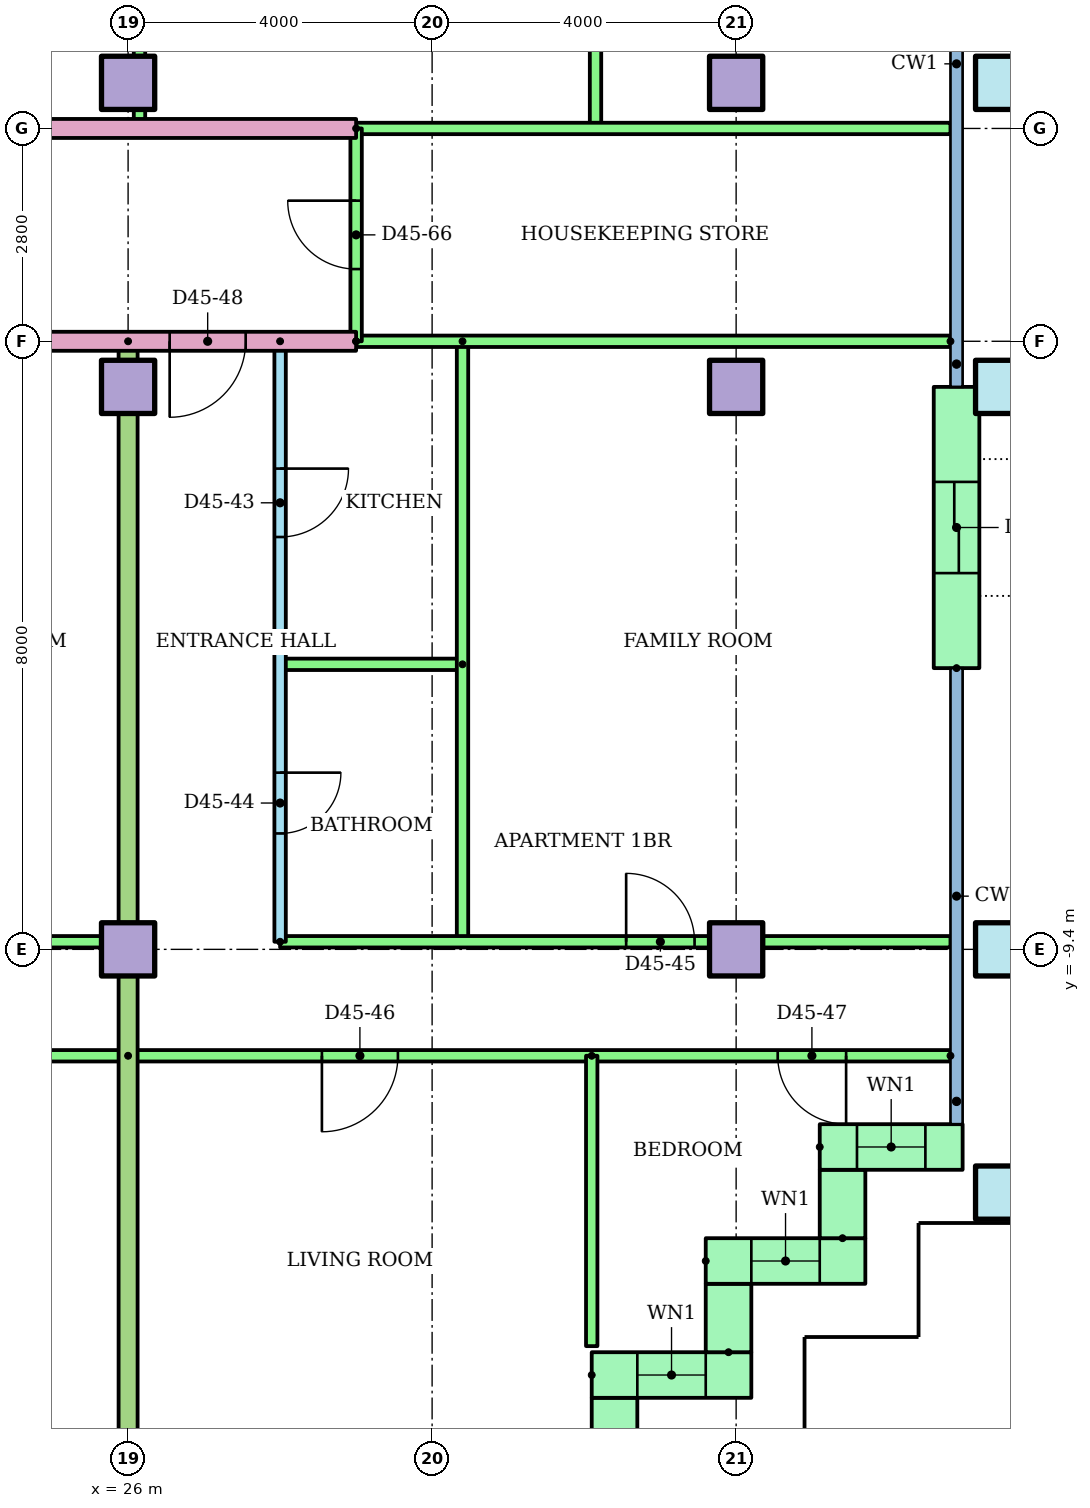
"""IFC4 building model, lengths in metres.
Left out: names, types, materials, properties, quantities, classifications, styles, units other than length and angle.
Written with IfcOpenShell. Run it as: python <this file> out.ifc"""

import sys

from ifc_helpers import new_model, si_unit, direction, frame, frame_2d, origin, origin_2d, place, context, subcontext, project, spatial, rectangle, hollow_rectangle, extrude, element, fill, save


model = new_model("IFC4")
c1 = context("Model", 3, precision=1e-05, world=origin(), true_north=direction((0.0, 1.0)))
c2 = subcontext(c1, "Body", "Model", "MODEL_VIEW")
j1 = project(units=[si_unit("LENGTHUNIT", "METRE"), si_unit("PLANEANGLEUNIT", "RADIAN")], contexts=[c1])
p1 = place(None, origin())
s1 = spatial("IfcSite", under=j1, at=p1, CompositionType="ELEMENT")
p2 = place(p1, origin())
s2 = spatial("IfcBuilding", under=s1, at=p2, CompositionType="ELEMENT")
p3 = place(p2, frame((0.0, 0.0, 174.9)))
s3 = spatial("IfcBuildingStorey", under=s2, at=p3, CompositionType="ELEMENT", Elevation=174.9)
p4 = place(p3, frame((37.5, -12.6, 0.0)))
e1 = element("IfcColumn", 1, at=p4, inside=s3, PredefinedType="COLUMN", context=c2, shape_type="SweptSolid", body=[
    extrude(hollow_rectangle(XDim=0.7, YDim=0.7, WallThickness=0.036, at=origin_2d()), origin(), (0.0, 0.0, 1.0), 3.2),
])
for number, where in (
    (2, (26.0, -9.4, 0.0)),
    (3, (34.0, -9.4, 0.0)),
):
    element("IfcColumn", number, at=place(p3, frame(where)), inside=s3, PredefinedType="COLUMN", context=c2, shape_type="SweptSolid", body=[
        extrude(rectangle(XDim=0.7, YDim=0.7, at=origin_2d()), origin(), (0.0, 0.0, 1.0), 3.2),
    ])
p5 = place(p3, frame((37.5, -9.4, 0.0)))
e4 = element("IfcColumn", 4, at=p5, inside=s3, PredefinedType="COLUMN", context=c2, shape_type="SweptSolid", body=[
    extrude(hollow_rectangle(XDim=0.7, YDim=0.7, WallThickness=0.036, at=origin_2d()), origin(), (0.0, 0.0, 1.0), 3.2),
])
for number, where in (
    (5, (26.0, -2.0, 0.0)),
    (6, (34.0, -2.0, 0.0)),
):
    element("IfcColumn", number, at=place(p3, frame(where)), inside=s3, PredefinedType="COLUMN", context=c2, shape_type="SweptSolid", body=[
        extrude(rectangle(XDim=0.7, YDim=0.7, at=origin_2d()), origin(), (0.0, 0.0, 1.0), 3.2),
    ])
p6 = place(p3, frame((37.5, -2.0, 0.0)))
e7 = element("IfcColumn", 7, at=p6, inside=s3, PredefinedType="COLUMN", context=c2, shape_type="SweptSolid", body=[
    extrude(hollow_rectangle(XDim=0.7, YDim=0.7, WallThickness=0.036, at=origin_2d()), origin(), (0.0, 0.0, 1.0), 3.2),
])
for number, where in (
    (8, (26.0, 2.0, 0.0)),
    (9, (34.0, 2.0, 0.0)),
):
    element("IfcColumn", number, at=place(p3, frame(where)), inside=s3, PredefinedType="COLUMN", context=c2, shape_type="SweptSolid", body=[
        extrude(rectangle(XDim=0.7, YDim=0.7, at=origin_2d()), origin(), (0.0, 0.0, 1.0), 3.2),
    ])
p7 = place(p3, frame((37.5, 2.0, 0.0)))
e10 = element("IfcColumn", 10, at=p7, inside=s3, PredefinedType="COLUMN", context=c2, shape_type="SweptSolid", body=[
    extrude(hollow_rectangle(XDim=0.7, YDim=0.7, WallThickness=0.036, at=origin_2d()), origin(), (0.0, 0.0, 1.0), 3.2),
])
p8 = place(p3, frame((32.4, -16.58, 0.0), z_axis=(0.0, 0.0, 1.0), x_axis=(0.0, 1.0, 0.0)))
e11 = element("IfcWall", 11, at=p8, inside=s3, PredefinedType="STANDARD", context=c2, shape_type="SweptSolid", body=[
    extrude(rectangle(XDim=1.28, YDim=0.6, at=frame_2d((0.64, 0.0))), origin(), (0.0, 0.0, 1.0), 2.92),
])
p9 = place(p3, frame((32.1, -15.0, 0.0)))
e12 = element("IfcWall", 12, at=p9, inside=s3, PredefinedType="STANDARD", context=c2, shape_type="SweptSolid", body=[
    extrude(rectangle(XDim=2.1, YDim=0.6, at=frame_2d((1.05, 0.0))), origin(), (0.0, 0.0, 1.0), 2.92),
])
p10 = place(p9, frame((0.6, 0.0, 0.9)))
e13 = element("IfcOpeningElement", 13, at=p10, cuts=e12, PredefinedType="OPENING", context=c2, shape_type="SweptSolid", body=[
    extrude(rectangle(XDim=0.9, YDim=1.5, at=frame_2d((0.45, 0.75))), frame((0.0, 0.31, 0.0), z_axis=(0.0, -1.0, 0.0), x_axis=(1.0, 0.0, 0.0)), (0.0, 0.0, 1.0), 0.62),
])
p11 = place(p3, frame((33.9, -14.7, 0.0), z_axis=(0.0, 0.0, 1.0), x_axis=(0.0, 1.0, 0.0)))
e14 = element("IfcWall", 14, at=p11, inside=s3, PredefinedType="STANDARD", context=c2, shape_type="SweptSolid", body=[
    extrude(rectangle(XDim=0.9, YDim=0.6, at=frame_2d((0.45, 0.0))), origin(), (0.0, 0.0, 1.0), 2.92),
])
p12 = place(p3, frame((33.6, -13.5, 0.0)))
e15 = element("IfcWall", 15, at=p12, inside=s3, PredefinedType="STANDARD", context=c2, shape_type="SweptSolid", body=[
    extrude(rectangle(XDim=2.1, YDim=0.6, at=frame_2d((1.05, 0.0))), origin(), (0.0, 0.0, 1.0), 2.92),
])
p13 = place(p12, frame((0.6, 0.0, 0.9)))
e16 = element("IfcOpeningElement", 16, at=p13, cuts=e15, PredefinedType="OPENING", context=c2, shape_type="SweptSolid", body=[
    extrude(rectangle(XDim=0.9, YDim=1.5, at=frame_2d((0.45, 0.75))), frame((0.0, 0.31, 0.0), z_axis=(0.0, -1.0, 0.0), x_axis=(1.0, 0.0, 0.0)), (0.0, 0.0, 1.0), 0.62),
])
p14 = place(p3, frame((35.4, -13.2, 0.0), z_axis=(0.0, 0.0, 1.0), x_axis=(0.0, 1.0, 0.0)))
e17 = element("IfcWall", 17, at=p14, inside=s3, PredefinedType="STANDARD", context=c2, shape_type="SweptSolid", body=[
    extrude(rectangle(XDim=0.9, YDim=0.6, at=frame_2d((0.45, 0.0))), origin(), (0.0, 0.0, 1.0), 2.92),
])
p15 = place(p3, frame((35.1, -12.0, 0.0)))
e18 = element("IfcWall", 18, at=p15, inside=s3, PredefinedType="STANDARD", context=c2, shape_type="SweptSolid", body=[
    extrude(rectangle(XDim=1.88, YDim=0.6, at=frame_2d((0.94, 0.0))), origin(), (0.0, 0.0, 1.0), 2.92),
])
p16 = place(p15, frame((0.49, 0.0, 0.9)))
e19 = element("IfcOpeningElement", 19, at=p16, cuts=e18, PredefinedType="OPENING", context=c2, shape_type="SweptSolid", body=[
    extrude(rectangle(XDim=0.9, YDim=1.5, at=frame_2d((0.45, 0.75))), frame((0.0, 0.31, 0.0), z_axis=(0.0, -1.0, 0.0), x_axis=(1.0, 0.0, 0.0)), (0.0, 0.0, 1.0), 0.62),
])
p17 = place(p3, frame((36.9, -5.7, 0.0), z_axis=(0.0, 0.0, 1.0), x_axis=(0.0, 1.0, 0.0)))
e20 = element("IfcWall", 20, at=p17, inside=s3, PredefinedType="STANDARD", context=c2, shape_type="SweptSolid", body=[
    extrude(rectangle(XDim=3.7, YDim=0.6, at=frame_2d((1.85, 0.0))), origin(), (0.0, 0.0, 1.0), 2.92),
])
p18 = place(p17, frame((1.25, 0.0, 0.0)))
e21 = element("IfcOpeningElement", 21, at=p18, cuts=e20, PredefinedType="OPENING", context=c2, shape_type="SweptSolid", body=[
    extrude(rectangle(XDim=1.2, YDim=2.1, at=frame_2d((0.6, 1.05))), frame((0.0, 0.31, 0.0), z_axis=(0.0, -1.0, 0.0), x_axis=(1.0, 0.0, 0.0)), (0.0, 0.0, 1.0), 0.62),
])
p19 = place(p3, frame((20.0, -9.3, 0.0)))
e22 = element("IfcWall", 22, at=p19, inside=s3, PredefinedType="PARTITIONING", context=c2, shape_type="SweptSolid", body=[
    extrude(rectangle(XDim=6.0, YDim=0.15, at=frame_2d((3.0, 0.0))), origin(), (0.0, 0.0, 1.0), 2.4),
])
p20 = place(p19, frame((3.75, 0.0, 0.0)))
e23 = element("IfcOpeningElement", 23, at=p20, cuts=e22, PredefinedType="OPENING", context=c2, shape_type="SweptSolid", body=[
    extrude(rectangle(XDim=0.9, YDim=2.1, at=frame_2d((0.45, 1.05))), frame((0.0, 0.085, 0.0), z_axis=(0.0, -1.0, 0.0), x_axis=(1.0, 0.0, 0.0)), (0.0, 0.0, 1.0), 0.17),
])
p21 = place(p3, frame((26.0, -10.8, 0.0), z_axis=(0.0, 0.0, 1.0), x_axis=(-1.0, 0.0, 0.0)))
e24 = element("IfcWall", 24, at=p21, inside=s3, PredefinedType="PARTITIONING", context=c2, shape_type="SweptSolid", body=[
    extrude(rectangle(XDim=8.0, YDim=0.15, at=frame_2d((4.0, 0.0))), origin(), (0.0, 0.0, 1.0), 2.4),
])
p22 = place(p21, frame((5.55, 0.0, 0.0)))
e25 = element("IfcOpeningElement", 25, at=p22, cuts=e24, PredefinedType="OPENING", context=c2, shape_type="SweptSolid", body=[
    extrude(rectangle(XDim=0.9, YDim=2.1, at=frame_2d((0.45, 1.05))), frame((0.0, 0.085, 0.0), z_axis=(0.0, -1.0, 0.0), x_axis=(1.0, 0.0, 0.0)), (0.0, 0.0, 1.0), 0.17),
])
p23 = place(p21, frame((1.5, 0.0, 0.0)))
e26 = element("IfcOpeningElement", 26, at=p23, cuts=e24, PredefinedType="OPENING", context=c2, shape_type="SweptSolid", body=[
    extrude(rectangle(XDim=1.0, YDim=2.1, at=frame_2d((0.5, 1.05))), frame((0.0, 0.085, 0.0), z_axis=(0.0, -1.0, 0.0), x_axis=(1.0, 0.0, 0.0)), (0.0, 0.0, 1.0), 0.17),
])
p24 = place(p3, frame((28.0, -1.4, 0.0), z_axis=(0.0, 0.0, 1.0), x_axis=(0.0, -1.0, 0.0)))
e27 = element("IfcWall", 27, at=p24, inside=s3, PredefinedType="PARTITIONING", context=c2, shape_type="SweptSolid", body=[
    extrude(rectangle(XDim=7.9, YDim=0.15, at=frame_2d((3.95, 0.0))), origin(), (0.0, 0.0, 1.0), 2.4),
])
p25 = place(p24, frame((1.675, 0.0, 0.0)))
e28 = element("IfcOpeningElement", 28, at=p25, cuts=e27, PredefinedType="OPENING", context=c2, shape_type="SweptSolid", body=[
    extrude(rectangle(XDim=0.9, YDim=2.1, at=frame_2d((0.45, 1.05))), frame((0.0, 0.085, 0.0), z_axis=(0.0, -1.0, 0.0), x_axis=(1.0, 0.0, 0.0)), (0.0, 0.0, 1.0), 0.17),
])
p26 = place(p24, frame((5.675, 0.0, 0.0)))
e29 = element("IfcOpeningElement", 29, at=p26, cuts=e27, PredefinedType="OPENING", context=c2, shape_type="SweptSolid", body=[
    extrude(rectangle(XDim=0.8, YDim=2.1, at=frame_2d((0.4, 1.05))), frame((0.0, 0.085, 0.0), z_axis=(0.0, -1.0, 0.0), x_axis=(1.0, 0.0, 0.0)), (0.0, 0.0, 1.0), 0.17),
])
p27 = place(p3, frame((30.4, -5.65, 0.0), z_axis=(0.0, 0.0, 1.0), x_axis=(-1.0, 0.0, 0.0)))
e30 = element("IfcWall", 30, at=p27, inside=s3, PredefinedType="PARTITIONING", context=c2, shape_type="SweptSolid", body=[
    extrude(rectangle(XDim=2.4, YDim=0.15, at=frame_2d((1.2, 0.0))), origin(), (0.0, 0.0, 1.0), 2.4),
])
p28 = place(p3, frame((30.4, -1.4, 0.0), z_axis=(0.0, 0.0, 1.0), x_axis=(0.0, -1.0, 0.0)))
e31 = element("IfcWall", 31, at=p28, inside=s3, PredefinedType="PARTITIONING", context=c2, shape_type="SweptSolid", body=[
    extrude(rectangle(XDim=7.9, YDim=0.15, at=frame_2d((3.95, 0.0))), origin(), (0.0, 0.0, 1.0), 2.4),
])
p29 = place(p3, frame((28.0, -9.3, 0.0)))
e32 = element("IfcWall", 32, at=p29, inside=s3, PredefinedType="PARTITIONING", context=c2, shape_type="SweptSolid", body=[
    extrude(rectangle(XDim=8.82, YDim=0.15, at=frame_2d((4.41, 0.0))), origin(), (0.0, 0.0, 1.0), 2.4),
])
p30 = place(p29, frame((4.553, 0.0, 0.0)))
e33 = element("IfcOpeningElement", 33, at=p30, cuts=e32, PredefinedType="OPENING", context=c2, shape_type="SweptSolid", body=[
    extrude(rectangle(XDim=0.9, YDim=2.1, at=frame_2d((0.45, 1.05))), frame((0.0, 0.085, 0.0), z_axis=(0.0, -1.0, 0.0), x_axis=(1.0, 0.0, 0.0)), (0.0, 0.0, 1.0), 0.17),
])
p31 = place(p3, frame((36.82, -10.8, 0.0), z_axis=(0.0, 0.0, 1.0), x_axis=(-1.0, 0.0, 0.0)))
e34 = element("IfcWall", 34, at=p31, inside=s3, PredefinedType="PARTITIONING", context=c2, shape_type="SweptSolid", body=[
    extrude(rectangle(XDim=10.82, YDim=0.15, at=frame_2d((5.41, 0.0))), origin(), (0.0, 0.0, 1.0), 2.4),
])
p32 = place(p31, frame((7.27, 0.0, 0.0)))
e35 = element("IfcOpeningElement", 35, at=p32, cuts=e34, PredefinedType="OPENING", context=c2, shape_type="SweptSolid", body=[
    extrude(rectangle(XDim=1.0, YDim=2.1, at=frame_2d((0.5, 1.05))), frame((0.0, 0.085, 0.0), z_axis=(0.0, -1.0, 0.0), x_axis=(1.0, 0.0, 0.0)), (0.0, 0.0, 1.0), 0.17),
])
p33 = place(p31, frame((1.373, 0.0, 0.0)))
e36 = element("IfcOpeningElement", 36, at=p33, cuts=e34, PredefinedType="OPENING", context=c2, shape_type="SweptSolid", body=[
    extrude(rectangle(XDim=0.9, YDim=2.1, at=frame_2d((0.45, 1.05))), frame((0.0, 0.085, 0.0), z_axis=(0.0, -1.0, 0.0), x_axis=(1.0, 0.0, 0.0)), (0.0, 0.0, 1.0), 0.17),
])
p34 = place(p3, frame((32.1, -10.8, 0.0), z_axis=(0.0, 0.0, 1.0), x_axis=(0.0, -1.0, 0.0)))
e37 = element("IfcWall", 37, at=p34, inside=s3, PredefinedType="PARTITIONING", context=c2, shape_type="SweptSolid", body=[
    extrude(rectangle(XDim=3.82, YDim=0.15, at=frame_2d((1.91, 0.0))), origin(), (0.0, 0.0, 1.0), 2.4),
])
p35 = place(p3, frame((26.0, -1.4, 0.0), z_axis=(0.0, 0.0, 1.0), x_axis=(0.0, -1.0, 0.0)))
e38 = element("IfcWall", 38, at=p35, inside=s3, PredefinedType="PARTITIONING", context=c2, shape_type="SweptSolid", body=[
    extrude(rectangle(XDim=15.01, YDim=0.25, at=frame_2d((7.505, 0.0))), origin(), (0.0, 0.0, 1.0), 2.4),
])
p36 = place(p3, frame((29.0, -1.4, 0.0), z_axis=(0.0, 0.0, 1.0), x_axis=(-1.0, 0.0, 0.0)))
e39 = element("IfcWall", 39, at=p36, inside=s3, PredefinedType="PARTITIONING", context=c2, shape_type="SweptSolid", body=[
    extrude(rectangle(XDim=15.0, YDim=0.25, at=frame_2d((7.5, 0.0))), origin(), (0.0, 0.0, 1.0), 2.4),
])
p37 = place(p36, frame((9.453, 0.0, 0.0)))
e40 = element("IfcOpeningElement", 40, at=p37, cuts=e39, PredefinedType="OPENING", context=c2, shape_type="SweptSolid", body=[
    extrude(rectangle(XDim=1.0, YDim=2.1, at=frame_2d((0.5, 1.05))), frame((0.0, 0.135, 0.0), z_axis=(0.0, -1.0, 0.0), x_axis=(1.0, 0.0, 0.0)), (0.0, 0.0, 1.0), 0.27),
])
p38 = place(p36, frame((1.453, 0.0, 0.0)))
e41 = element("IfcOpeningElement", 41, at=p38, cuts=e39, PredefinedType="OPENING", context=c2, shape_type="SweptSolid", body=[
    extrude(rectangle(XDim=1.0, YDim=2.1, at=frame_2d((0.5, 1.05))), frame((0.0, 0.135, 0.0), z_axis=(0.0, -1.0, 0.0), x_axis=(1.0, 0.0, 0.0)), (0.0, 0.0, 1.0), 0.27),
])
p39 = place(p3, frame((36.82, -1.4, 0.0), z_axis=(0.0, 0.0, 1.0), x_axis=(-1.0, 0.0, 0.0)))
e42 = element("IfcWall", 42, at=p39, inside=s3, PredefinedType="PARTITIONING", context=c2, shape_type="SweptSolid", body=[
    extrude(rectangle(XDim=7.82, YDim=0.15, at=frame_2d((3.91, 0.0))), origin(), (0.0, 0.0, 1.0), 2.4),
])
for number, where, z_axis, x_axis in (
    (43, (26.15, 11.7, 0.0), (0.0, 0.0, 1.0), (0.0, -1.0, 0.0)),
    (44, (32.15, 11.7, 0.0), (0.0, 0.0, 1.0), (0.0, -1.0, 0.0)),
):
    element("IfcWall", number, at=place(p3, frame(where, z_axis=z_axis, x_axis=x_axis)), inside=s3, PredefinedType="PARTITIONING", context=c2, shape_type="SweptSolid", body=[
        extrude(rectangle(XDim=10.3, YDim=0.15, at=frame_2d((5.15, 0.0))), origin(), (0.0, 0.0, 1.0), 2.4),
    ])
p40 = place(p3, frame((14.0, 1.4, 0.0)))
e45 = element("IfcWall", 45, at=p40, inside=s3, PredefinedType="PARTITIONING", context=c2, shape_type="SweptSolid", body=[
    extrude(rectangle(XDim=15.0, YDim=0.25, at=frame_2d((7.5, 0.0))), origin(), (0.0, 0.0, 1.0), 2.4),
])
p41 = place(p40, frame((0.5, 0.0, 0.0)))
e46 = element("IfcOpeningElement", 46, at=p41, cuts=e45, PredefinedType="OPENING", context=c2, shape_type="SweptSolid", body=[
    extrude(rectangle(XDim=1.0, YDim=2.1, at=frame_2d((0.5, 1.05))), frame((0.0, 0.135, 0.0), z_axis=(0.0, -1.0, 0.0), x_axis=(1.0, 0.0, 0.0)), (0.0, 0.0, 1.0), 0.27),
])
p42 = place(p3, frame((29.0, 1.4, 0.0)))
e47 = element("IfcWall", 47, at=p42, inside=s3, PredefinedType="PARTITIONING", context=c2, shape_type="SweptSolid", body=[
    extrude(rectangle(XDim=7.82, YDim=0.15, at=frame_2d((3.91, 0.0))), origin(), (0.0, 0.0, 1.0), 2.4),
])
p43 = place(p3, frame((29.0, -1.4, 0.0), z_axis=(0.0, 0.0, 1.0), x_axis=(0.0, 1.0, 0.0)))
e48 = element("IfcWall", 48, at=p43, inside=s3, PredefinedType="PARTITIONING", context=c2, shape_type="SweptSolid", body=[
    extrude(rectangle(XDim=2.8, YDim=0.15, at=frame_2d((1.4, 0.0))), origin(), (0.0, 0.0, 1.0), 2.4),
])
p44 = place(p43, frame((0.95, 0.0, 0.0)))
e49 = element("IfcOpeningElement", 49, at=p44, cuts=e48, PredefinedType="OPENING", context=c2, shape_type="SweptSolid", body=[
    extrude(rectangle(XDim=0.9, YDim=2.1, at=frame_2d((0.45, 1.05))), frame((0.0, 0.085, 0.0), z_axis=(0.0, -1.0, 0.0), x_axis=(1.0, 0.0, 0.0)), (0.0, 0.0, 1.0), 0.17),
])
p45 = place(p10, origin())
e50 = element("IfcWindow", 50, at=p45, inside=s3, PartitioningType="SINGLE_PANEL", PredefinedType="WINDOW", context=c2, shape_type="SweptSolid", body=[
    extrude(rectangle(XDim=0.9, YDim=1.5, at=frame_2d((0.45, 0.75))), frame((0.0, 0.03, 0.0), z_axis=(0.0, -1.0, 0.0), x_axis=(1.0, 0.0, 0.0)), (0.0, 0.0, 1.0), 0.06),
])
fill(e13, e50)
p46 = place(p13, origin())
e51 = element("IfcWindow", 51, at=p46, inside=s3, PartitioningType="SINGLE_PANEL", PredefinedType="WINDOW", context=c2, shape_type="SweptSolid", body=[
    extrude(rectangle(XDim=0.9, YDim=1.5, at=frame_2d((0.45, 0.75))), frame((0.0, 0.03, 0.0), z_axis=(0.0, -1.0, 0.0), x_axis=(1.0, 0.0, 0.0)), (0.0, 0.0, 1.0), 0.06),
])
fill(e16, e51)
p47 = place(p16, origin())
e52 = element("IfcWindow", 52, at=p47, inside=s3, PartitioningType="SINGLE_PANEL", PredefinedType="WINDOW", context=c2, shape_type="SweptSolid", body=[
    extrude(rectangle(XDim=0.9, YDim=1.5, at=frame_2d((0.45, 0.75))), frame((0.0, 0.03, 0.0), z_axis=(0.0, -1.0, 0.0), x_axis=(1.0, 0.0, 0.0)), (0.0, 0.0, 1.0), 0.06),
])
fill(e19, e52)
p48 = place(p25, origin())
e53 = element("IfcDoor", 53, at=p48, inside=s3, OperationType="SINGLE_SWING_LEFT", PredefinedType="DOOR", context=c2, shape_type="SweptSolid", body=[
    extrude(rectangle(XDim=0.9, YDim=2.1, at=frame_2d((0.45, 1.05))), frame((0.0, 0.025, 0.0), z_axis=(0.0, -1.0, 0.0), x_axis=(1.0, 0.0, 0.0)), (0.0, 0.0, 1.0), 0.05),
])
fill(e28, e53)
p49 = place(p26, origin())
e54 = element("IfcDoor", 54, at=p49, inside=s3, OperationType="SINGLE_SWING_LEFT", PredefinedType="DOOR", context=c2, shape_type="SweptSolid", body=[
    extrude(rectangle(XDim=0.8, YDim=2.1, at=frame_2d((0.4, 1.05))), frame((0.0, 0.025, 0.0), z_axis=(0.0, -1.0, 0.0), x_axis=(1.0, 0.0, 0.0)), (0.0, 0.0, 1.0), 0.05),
])
fill(e29, e54)
p50 = place(p30, origin())
e55 = element("IfcDoor", 55, at=p50, inside=s3, OperationType="SINGLE_SWING_LEFT", PredefinedType="DOOR", context=c2, shape_type="SweptSolid", body=[
    extrude(rectangle(XDim=0.9, YDim=2.1, at=frame_2d((0.45, 1.05))), frame((0.0, 0.025, 0.0), z_axis=(0.0, -1.0, 0.0), x_axis=(1.0, 0.0, 0.0)), (0.0, 0.0, 1.0), 0.05),
])
fill(e33, e55)
p51 = place(p32, origin())
e56 = element("IfcDoor", 56, at=p51, inside=s3, OperationType="SINGLE_SWING_RIGHT", PredefinedType="DOOR", context=c2, shape_type="SweptSolid", body=[
    extrude(rectangle(XDim=1.0, YDim=2.1, at=frame_2d((0.5, 1.05))), frame((0.0, 0.025, 0.0), z_axis=(0.0, -1.0, 0.0), x_axis=(1.0, 0.0, 0.0)), (0.0, 0.0, 1.0), 0.05),
])
fill(e35, e56)
p52 = place(p33, origin())
e57 = element("IfcDoor", 57, at=p52, inside=s3, OperationType="SINGLE_SWING_LEFT", PredefinedType="DOOR", context=c2, shape_type="SweptSolid", body=[
    extrude(rectangle(XDim=0.9, YDim=2.1, at=frame_2d((0.45, 1.05))), frame((0.0, 0.025, 0.0), z_axis=(0.0, -1.0, 0.0), x_axis=(1.0, 0.0, 0.0)), (0.0, 0.0, 1.0), 0.05),
])
fill(e36, e57)
p53 = place(p38, origin())
e58 = element("IfcDoor", 58, at=p53, inside=s3, OperationType="SINGLE_SWING_RIGHT", PredefinedType="DOOR", context=c2, shape_type="SweptSolid", body=[
    extrude(rectangle(XDim=1.0, YDim=2.1, at=frame_2d((0.5, 1.05))), frame((0.0, 0.025, 0.0), z_axis=(0.0, -1.0, 0.0), x_axis=(1.0, 0.0, 0.0)), (0.0, 0.0, 1.0), 0.05),
])
fill(e41, e58)
p54 = place(p44, origin())
e59 = element("IfcDoor", 59, at=p54, inside=s3, OperationType="SINGLE_SWING_RIGHT", PredefinedType="DOOR", context=c2, shape_type="SweptSolid", body=[
    extrude(rectangle(XDim=0.9, YDim=2.1, at=frame_2d((0.45, 1.05))), frame((0.0, 0.025, 0.0), z_axis=(0.0, -1.0, 0.0), x_axis=(1.0, 0.0, 0.0)), (0.0, 0.0, 1.0), 0.05),
])
fill(e49, e59)
p55 = place(p18, origin())
e60 = element("IfcDoor", 60, at=p55, inside=s3, OperationType="SLIDING_TO_LEFT", PredefinedType="DOOR", context=c2, shape_type="SweptSolid", body=[
    extrude(rectangle(XDim=1.2, YDim=2.1, at=frame_2d((0.6, 1.05))), frame((0.0, 0.025, 0.0), z_axis=(0.0, -1.0, 0.0), x_axis=(1.0, 0.0, 0.0)), (0.0, 0.0, 1.0), 0.05),
])
fill(e21, e60)
save(model, sys.argv[1])
